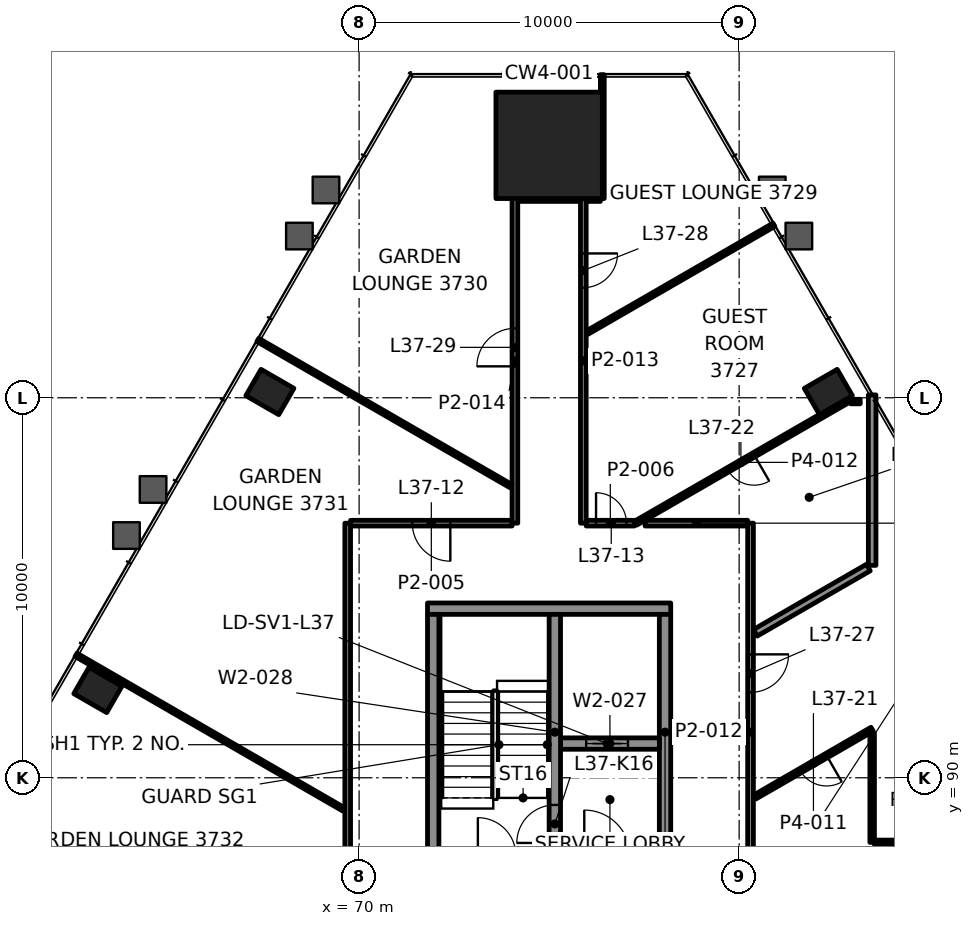
"""IFC4 building model, lengths in metres.
Left out: names, types, materials, properties, quantities, classifications, styles, units other than length and angle.
Written with IfcOpenShell. Run it as: python <this file> out.ifc"""

import sys

from ifc_helpers import new_model, si_unit, direction, frame, frame_2d, origin, origin_2d, place, context, subcontext, project, spatial, rectangle, hollow_rectangle, extrude, element, fill, save


model = new_model("IFC4")
c1 = context("Model", 3, precision=1e-05, world=origin(), true_north=direction((0.0, 1.0)))
c2 = subcontext(c1, "Body", "Model", "MODEL_VIEW")
j1 = project(units=[si_unit("LENGTHUNIT", "METRE"), si_unit("PLANEANGLEUNIT", "RADIAN")], contexts=[c1])
p1 = place(None, origin())
s1 = spatial("IfcSite", under=j1, at=p1, CompositionType="ELEMENT")
p2 = place(p1, origin())
s2 = spatial("IfcBuilding", under=s1, at=p2, CompositionType="ELEMENT")
p3 = place(p2, frame((0.0, 0.0, 163.6)))
s3 = spatial("IfcBuildingStorey", under=s2, at=p3, CompositionType="ELEMENT", Elevation=163.6)
p4 = place(p3, frame((75.0, 106.642, 0.0), z_axis=(0.0, 0.0, 1.0), x_axis=(-1.0, 0.0, 0.0)))
e1 = element("IfcColumn", 1, at=p4, inside=s3, PredefinedType="COLUMN", context=c2, shape_type="SweptSolid", body=[
    extrude(rectangle(XDim=2.8, YDim=2.8, at=origin_2d()), origin(), (0.0, 0.0, 1.0), 3.9),
])
for number, where, z_axis, x_axis in (
    (2, (82.348, 100.151, -0.0), (0.0, 0.0, 1.0), (-0.5, 0.866, 0.0)),
    (3, (67.652, 100.151, -0.0), (0.0, 0.0, 1.0), (-0.5, -0.866, 0.0)),
    (4, (63.125, 92.31, -0.0), (0.0, 0.0, 1.0), (-0.5, -0.866, 0.0)),
):
    element("IfcColumn", number, at=place(p3, frame(where, z_axis=z_axis, x_axis=x_axis)), inside=s3, PredefinedType="COLUMN", context=c2, shape_type="SweptSolid", body=[
        extrude(hollow_rectangle(XDim=0.8, YDim=1.0, WallThickness=0.05, at=origin_2d()), origin(), (0.0, 0.0, 1.0), 3.9),
    ])
p5 = place(p3, frame((71.8, 94.45, 0.0), z_axis=(0.0, 0.0, 1.0), x_axis=(1.0, 0.0, 0.0)))
e5 = element("IfcWall", 5, at=p5, inside=s3, PredefinedType="SHEAR", context=c2, shape_type="SweptSolid", body=[
    extrude(rectangle(XDim=6.4, YDim=0.3, at=frame_2d((3.2, 0.0))), origin(), (0.0, 0.0, 1.0), 3.7),
])
for number, where, z_axis, x_axis in (
    (6, (71.95, 88.1, 0.0), (0.0, 0.0, 1.0), (0.0, 1.0, 0.0)),
    (7, (78.05, 88.1, 0.0), (0.0, 0.0, 1.0), (0.0, 1.0, 0.0)),
):
    element("IfcWall", number, at=place(p3, frame(where, z_axis=z_axis, x_axis=x_axis)), inside=s3, PredefinedType="SHEAR", context=c2, shape_type="SweptSolid", body=[
        extrude(rectangle(XDim=6.2, YDim=0.3, at=frame_2d((3.1, 0.0))), origin(), (0.0, 0.0, 1.0), 3.7),
    ])
p6 = place(p3, frame((75.3, 90.9, 0.0), z_axis=(0.0, 0.0, 1.0), x_axis=(1.0, 0.0, 0.0)))
e8 = element("IfcWall", 8, at=p6, inside=s3, PredefinedType="SHEAR", context=c2, shape_type="SweptSolid", body=[
    extrude(rectangle(XDim=2.6, YDim=0.3, at=frame_2d((1.3, 0.0))), origin(), (0.0, 0.0, 1.0), 3.7),
])
p7 = place(p6, frame((0.675, 0.0, 0.0)))
e9 = element("IfcOpeningElement", 9, at=p7, cuts=e8, PredefinedType="OPENING", context=c2, shape_type="SweptSolid", body=[
    extrude(rectangle(XDim=1.1, YDim=2.1, at=frame_2d((0.55, 1.05))), frame((0.0, 0.16, 0.0), z_axis=(0.0, -1.0, 0.0), x_axis=(1.0, 0.0, 0.0)), (0.0, 0.0, 1.0), 0.32),
])
p8 = place(p3, frame((75.15, 88.1, 0.0), z_axis=(0.0, 0.0, 1.0), x_axis=(0.0, 1.0, 0.0)))
e10 = element("IfcWall", 10, at=p8, inside=s3, PredefinedType="SHEAR", context=c2, shape_type="SweptSolid", body=[
    extrude(rectangle(XDim=6.2, YDim=0.3, at=frame_2d((3.1, 0.0))), origin(), (0.0, 0.0, 1.0), 3.7),
])
p9 = place(p8, frame((0.185, 0.0, 0.0)))
e11 = element("IfcOpeningElement", 11, at=p9, cuts=e10, PredefinedType="OPENING", context=c2, shape_type="SweptSolid", body=[
    extrude(rectangle(XDim=1.0, YDim=2.1, at=frame_2d((0.5, 1.05))), frame((0.0, 0.16, 0.0), z_axis=(0.0, -1.0, 0.0), x_axis=(1.0, 0.0, 0.0)), (0.0, 0.0, 1.0), 0.32),
])
p10 = place(p3, frame((83.56, 88.3, 0.0), z_axis=(0.0, 0.0, 1.0), x_axis=(1.0, 0.0, 0.0)))
e12 = element("IfcWall", 12, at=p10, inside=s3, PredefinedType="PARTITIONING", context=c2, shape_type="SweptSolid", body=[
    extrude(rectangle(XDim=0.585, YDim=0.12, at=frame_2d((0.292, 0.0))), origin(), (0.0, 0.0, 1.0), 3.1),
])
p11 = place(p3, frame((74.025, 96.7, 0.0), z_axis=(0.0, 0.0, 1.0), x_axis=(-1.0, 0.0, 0.0)))
e13 = element("IfcWall", 13, at=p11, inside=s3, PredefinedType="PARTITIONING", context=c2, shape_type="SweptSolid", body=[
    extrude(rectangle(XDim=4.25, YDim=0.15, at=frame_2d((2.125, 0.0))), origin(), (0.0, 0.0, 1.0), 3.1),
])
p12 = place(p11, frame((1.625, 0.0, 0.0)))
e14 = element("IfcOpeningElement", 14, at=p12, cuts=e13, PredefinedType="OPENING", context=c2, shape_type="SweptSolid", body=[
    extrude(rectangle(XDim=1.0, YDim=2.1, at=frame_2d((0.5, 1.05))), frame((0.0, 0.085, 0.0), z_axis=(0.0, -1.0, 0.0), x_axis=(1.0, 0.0, 0.0)), (0.0, 0.0, 1.0), 0.17),
])
p13 = place(p3, frame((75.975, 96.7, 0.0), z_axis=(0.0, 0.0, 1.0), x_axis=(1.0, 0.0, 0.0)))
e15 = element("IfcWall", 15, at=p13, inside=s3, PredefinedType="PARTITIONING", context=c2, shape_type="SweptSolid", body=[
    extrude(rectangle(XDim=1.27, YDim=0.15, at=frame_2d((0.635, 0.0))), origin(), (0.0, 0.0, 1.0), 3.1),
])
p14 = place(p13, frame((0.26, 0.0, 0.0)))
e16 = element("IfcOpeningElement", 16, at=p14, cuts=e15, PredefinedType="OPENING", context=c2, shape_type="SweptSolid", body=[
    extrude(rectangle(XDim=0.8, YDim=2.1, at=frame_2d((0.4, 1.05))), frame((0.0, 0.085, 0.0), z_axis=(0.0, -1.0, 0.0), x_axis=(1.0, 0.0, 0.0)), (0.0, 0.0, 1.0), 0.17),
])
p15 = place(p3, frame((82.938, 99.9, 0.0), z_axis=(0.0, 0.0, 1.0), x_axis=(1.0, 0.0, 0.0)))
e17 = element("IfcWall", 17, at=p15, inside=s3, PredefinedType="PARTITIONING", context=c2, shape_type="SweptSolid", body=[
    extrude(rectangle(XDim=0.248, YDim=0.12, at=frame_2d((0.124, 0.0))), origin(), (0.0, 0.0, 1.0), 3.1),
])
p16 = place(p3, frame((74.176, 105.242, 0.0), z_axis=(0.0, 0.0, 1.0), x_axis=(1.0, 0.0, 0.0)))
e18 = element("IfcWall", 18, at=p16, inside=s3, PredefinedType="PARTITIONING", context=c2, shape_type="SweptSolid", body=[
    extrude(rectangle(XDim=1.649, YDim=0.15, at=frame_2d((0.825, 0.0))), origin(), (0.0, 0.0, 1.0), 3.097),
])
p17 = place(p3, frame((80.427, 85.974, 0.0), z_axis=(0.0, 0.0, 1.0), x_axis=(0.866031085144, 0.499990159468, 0.0)))
e19 = element("IfcWall", 19, at=p17, inside=s3, PredefinedType="PARTITIONING", context=c2, shape_type="SweptSolid", body=[
    extrude(rectangle(XDim=5.052, YDim=0.2, at=frame_2d((2.526, 0.0))), origin(), (0.0, 0.0, 1.0), 3.1),
])
p18 = place(p3, frame((83.5, 91.277, 0.0), z_axis=(0.0, 0.0, 1.0), x_axis=(-0.866028357664, -0.499994883695, 0.0)))
e20 = element("IfcWall", 20, at=p18, inside=s3, PredefinedType="PARTITIONING", context=c2, shape_type="SweptSolid", body=[
    extrude(rectangle(XDim=3.568, YDim=0.12, at=frame_2d((1.784, 0.0))), origin(), (0.0, 0.0, 1.0), 3.1),
])
p19 = place(p18, frame((1.384, 0.0, 0.0)))
e21 = element("IfcOpeningElement", 21, at=p19, cuts=e20, PredefinedType="OPENING", context=c2, shape_type="SweptSolid", body=[
    extrude(rectangle(XDim=0.8, YDim=2.1, at=frame_2d((0.4, 1.05))), frame((0.0, 0.07, 0.0), z_axis=(0.0, -1.0, 0.0), x_axis=(1.0, 0.0, 0.0)), (0.0, 0.0, 1.0), 0.14),
])
p20 = place(p3, frame((80.427, 93.815, 0.0), z_axis=(0.0, 0.0, 1.0), x_axis=(0.866037544249, 0.499978971509, 0.0)))
e22 = element("IfcWall", 22, at=p20, inside=s3, PredefinedType="PARTITIONING", context=c2, shape_type="SweptSolid", body=[
    extrude(rectangle(XDim=3.433, YDim=0.2, at=frame_2d((1.716, 0.0))), origin(), (0.0, 0.0, 1.0), 3.1),
])
p21 = place(p3, frame((82.818, 99.9, 0.0), z_axis=(0.0, 0.0, 1.0), x_axis=(-0.866025499775, -0.499999833739, 0.0)))
e23 = element("IfcWall", 23, at=p21, inside=s3, PredefinedType="PARTITIONING", context=c2, shape_type="SweptSolid", body=[
    extrude(rectangle(XDim=6.4, YDim=0.12, at=frame_2d((3.2, 0.0))), origin(), (0.0, 0.0, 1.0), 2.865),
])
p22 = place(p21, frame((2.8, 0.0, 0.0)))
e24 = element("IfcOpeningElement", 24, at=p22, cuts=e23, PredefinedType="OPENING", context=c2, shape_type="SweptSolid", body=[
    extrude(rectangle(XDim=0.8, YDim=2.1, at=frame_2d((0.4, 1.05))), frame((0.0, 0.07, 0.0), z_axis=(0.0, -1.0, 0.0), x_axis=(1.0, 0.0, 0.0)), (0.0, 0.0, 1.0), 0.14),
])
p23 = place(p3, frame((76.001, 101.715, 0.0), z_axis=(0.0, 0.0, 1.0), x_axis=(0.866015782696, 0.500016663843, 0.0)))
e25 = element("IfcWall", 25, at=p23, inside=s3, PredefinedType="PARTITIONING", context=c2, shape_type="SweptSolid", body=[
    extrude(rectangle(XDim=5.675, YDim=0.1, at=frame_2d((2.837, 0.0))), origin(), (0.0, 0.0, 1.0), 3.1),
])
p24 = place(p3, frame((83.5, 88.3, 0.0), z_axis=(0.0, 0.0, 1.0), x_axis=(0.0, 1.0, 0.0)))
e26 = element("IfcWall", 26, at=p24, inside=s3, PredefinedType="PARTITIONING", context=c2, shape_type="SweptSolid", body=[
    extrude(rectangle(XDim=2.868, YDim=0.12, at=frame_2d((1.434, 0.0))), origin(), (0.0, 0.0, 1.0), 3.022),
])
p25 = place(p3, frame((83.5, 95.589, 0.0), z_axis=(0.0, 0.0, 1.0), x_axis=(0.0, 1.0, 0.0)))
e27 = element("IfcWall", 27, at=p25, inside=s3, PredefinedType="PARTITIONING", context=c2, shape_type="SweptSolid", body=[
    extrude(rectangle(XDim=4.486, YDim=0.2, at=frame_2d((2.243, 0.0))), origin(), (0.0, 0.0, 1.0), 2.865),
])
p26 = place(p3, frame((80.3, 96.7, 0.0), z_axis=(0.0, 0.0, 1.0), x_axis=(0.0, -1.0, 0.0)))
e28 = element("IfcWall", 28, at=p26, inside=s3, PredefinedType="PARTITIONING", context=c2, shape_type="SweptSolid", body=[
    extrude(rectangle(XDim=11.0, YDim=0.15, at=frame_2d((5.5, 0.0))), origin(), (0.0, 0.0, 1.0), 3.022),
])
p27 = place(p26, frame((3.452, 0.0, 0.0)))
e29 = element("IfcOpeningElement", 29, at=p27, cuts=e28, PredefinedType="OPENING", context=c2, shape_type="SweptSolid", body=[
    extrude(rectangle(XDim=1.0, YDim=2.1, at=frame_2d((0.5, 1.05))), frame((0.0, 0.085, 0.0), z_axis=(0.0, -1.0, 0.0), x_axis=(1.0, 0.0, 0.0)), (0.0, 0.0, 1.0), 0.17),
])
p28 = place(p3, frame((76.4, 105.243, 0.0), z_axis=(0.0, 0.0, 1.0), x_axis=(0.0, 1.0, 0.0)))
e30 = element("IfcWall", 30, at=p28, inside=s3, PredefinedType="PARTITIONING", context=c2, shape_type="SweptSolid", body=[
    extrude(rectangle(XDim=3.26, YDim=0.1, at=frame_2d((1.63, 0.0))), origin(), (0.0, 0.0, 1.0), 3.1),
])
p29 = place(p3, frame((75.9, 105.242, 0.0), z_axis=(0.0, 0.0, 1.0), x_axis=(0.0, -1.0, 0.0)))
e31 = element("IfcWall", 31, at=p29, inside=s3, PredefinedType="PARTITIONING", context=c2, shape_type="SweptSolid", body=[
    extrude(rectangle(XDim=8.542, YDim=0.15, at=frame_2d((4.271, 0.0))), origin(), (0.0, 0.0, 1.0), 3.1),
])
p30 = place(p29, frame((1.445, 0.0, 0.0)))
e32 = element("IfcOpeningElement", 32, at=p30, cuts=e31, PredefinedType="OPENING", context=c2, shape_type="SweptSolid", body=[
    extrude(rectangle(XDim=0.9, YDim=2.1, at=frame_2d((0.45, 1.05))), frame((0.0, 0.085, 0.0), z_axis=(0.0, -1.0, 0.0), x_axis=(1.0, 0.0, 0.0)), (0.0, 0.0, 1.0), 0.17),
])
p31 = place(p3, frame((74.1, 96.7, 0.0), z_axis=(0.0, 0.0, 1.0), x_axis=(0.0, 1.0, 0.0)))
e33 = element("IfcWall", 33, at=p31, inside=s3, PredefinedType="PARTITIONING", context=c2, shape_type="SweptSolid", body=[
    extrude(rectangle(XDim=8.542, YDim=0.15, at=frame_2d((4.271, 0.0))), origin(), (0.0, 0.0, 1.0), 3.1),
])
p32 = place(p31, frame((4.127, 0.0, 0.0)))
e34 = element("IfcOpeningElement", 34, at=p32, cuts=e33, PredefinedType="OPENING", context=c2, shape_type="SweptSolid", body=[
    extrude(rectangle(XDim=1.0, YDim=2.1, at=frame_2d((0.5, 1.05))), frame((0.0, 0.085, 0.0), z_axis=(0.0, -1.0, 0.0), x_axis=(1.0, 0.0, 0.0)), (0.0, 0.0, 1.0), 0.17),
])
p33 = place(p3, frame((69.7, 85.7, 0.0), z_axis=(0.0, 0.0, 1.0), x_axis=(0.0, 1.0, 0.0)))
e35 = element("IfcWall", 35, at=p33, inside=s3, PredefinedType="PARTITIONING", context=c2, shape_type="SweptSolid", body=[
    extrude(rectangle(XDim=10.999, YDim=0.15, at=frame_2d((5.5, 0.0))), origin(), (0.0, 0.0, 1.0), 3.022),
])
p34 = place(p3, frame((73.999, 97.673, 0.0), z_axis=(0.0, 0.0, 1.0), x_axis=(-0.86601864019, 0.500011714706, 0.0)))
e36 = element("IfcWall", 36, at=p34, inside=s3, PredefinedType="PARTITIONING", context=c2, shape_type="SweptSolid", body=[
    extrude(rectangle(XDim=7.696, YDim=0.1, at=frame_2d((3.848, 0.0))), origin(), (0.0, 0.0, 1.0), 3.1),
])
p35 = place(p3, frame((69.599, 89.166, 0.0), z_axis=(0.0, 0.0, 1.0), x_axis=(-0.866026732215, 0.499997699084, 0.0)))
e37 = element("IfcWall", 37, at=p35, inside=s3, PredefinedType="PARTITIONING", context=c2, shape_type="SweptSolid", body=[
    extrude(rectangle(XDim=8.139, YDim=0.1, at=frame_2d((4.069, 0.0))), origin(), (0.0, 0.0, 1.0), 2.865),
])
p36 = place(p3, frame((77.525, 96.7, 0.0), z_axis=(0.0, 0.0, 1.0), x_axis=(1.0, 0.0, 0.0)))
e38 = element("IfcWall", 38, at=p36, inside=s3, PredefinedType="PARTITIONING", context=c2, shape_type="SweptSolid", body=[
    extrude(rectangle(XDim=2.7, YDim=0.15, at=frame_2d((1.35, 0.0))), origin(), (0.0, 0.0, 1.0), 3.1),
])
p37 = place(p3, frame((75.975, 105.242, 0.0), z_axis=(0.0, 0.0, 1.0), x_axis=(1.0, 0.0, 0.0)))
e39 = element("IfcWall", 39, at=p37, inside=s3, PredefinedType="PARTITIONING", context=c2, shape_type="SweptSolid", body=[
    extrude(rectangle(XDim=0.375, YDim=0.15, at=frame_2d((0.187, 0.0))), origin(), (0.0, 0.0, 1.0), 3.1),
])
p38 = place(p12, origin())
e40 = element("IfcDoor", 40, at=p38, inside=s3, OperationType="SINGLE_SWING_LEFT", PredefinedType="DOOR", context=c2, shape_type="SweptSolid", body=[
    extrude(rectangle(XDim=1.0, YDim=2.1, at=frame_2d((0.5, 1.05))), frame((0.0, 0.025, 0.0), z_axis=(0.0, -1.0, 0.0), x_axis=(1.0, 0.0, 0.0)), (0.0, 0.0, 1.0), 0.05),
])
fill(e14, e40)
p39 = place(p14, origin())
e41 = element("IfcDoor", 41, at=p39, inside=s3, OperationType="SINGLE_SWING_RIGHT", PredefinedType="DOOR", context=c2, shape_type="SweptSolid", body=[
    extrude(rectangle(XDim=0.8, YDim=2.1, at=frame_2d((0.4, 1.05))), frame((0.0, 0.025, 0.0), z_axis=(0.0, -1.0, 0.0), x_axis=(1.0, 0.0, 0.0)), (0.0, 0.0, 1.0), 0.05),
])
fill(e16, e41)
p40 = place(p19, origin())
e42 = element("IfcDoor", 42, at=p40, inside=s3, OperationType="SINGLE_SWING_RIGHT", PredefinedType="DOOR", context=c2, shape_type="SweptSolid", body=[
    extrude(rectangle(XDim=0.8, YDim=2.1, at=frame_2d((0.4, 1.05))), frame((0.0, 0.025, 0.0), z_axis=(0.0, -1.0, 0.0), x_axis=(1.0, 0.0, 0.0)), (0.0, 0.0, 1.0), 0.05),
])
fill(e21, e42)
p41 = place(p22, origin())
e43 = element("IfcDoor", 43, at=p41, inside=s3, OperationType="SINGLE_SWING_RIGHT", PredefinedType="DOOR", context=c2, shape_type="SweptSolid", body=[
    extrude(rectangle(XDim=0.8, YDim=2.1, at=frame_2d((0.4, 1.05))), frame((0.0, 0.025, 0.0), z_axis=(0.0, -1.0, 0.0), x_axis=(1.0, 0.0, 0.0)), (0.0, 0.0, 1.0), 0.05),
])
fill(e24, e43)
p42 = place(p27, origin())
e44 = element("IfcDoor", 44, at=p42, inside=s3, OperationType="SINGLE_SWING_LEFT", PredefinedType="DOOR", context=c2, shape_type="SweptSolid", body=[
    extrude(rectangle(XDim=1.0, YDim=2.1, at=frame_2d((0.5, 1.05))), frame((0.0, 0.025, 0.0), z_axis=(0.0, -1.0, 0.0), x_axis=(1.0, 0.0, 0.0)), (0.0, 0.0, 1.0), 0.05),
])
fill(e29, e44)
p43 = place(p30, origin())
e45 = element("IfcDoor", 45, at=p43, inside=s3, OperationType="SINGLE_SWING_LEFT", PredefinedType="DOOR", context=c2, shape_type="SweptSolid", body=[
    extrude(rectangle(XDim=0.9, YDim=2.1, at=frame_2d((0.45, 1.05))), frame((0.0, 0.025, 0.0), z_axis=(0.0, -1.0, 0.0), x_axis=(1.0, 0.0, 0.0)), (0.0, 0.0, 1.0), 0.05),
])
fill(e32, e45)
p44 = place(p32, origin())
e46 = element("IfcDoor", 46, at=p44, inside=s3, OperationType="SINGLE_SWING_LEFT", PredefinedType="DOOR", context=c2, shape_type="SweptSolid", body=[
    extrude(rectangle(XDim=1.0, YDim=2.1, at=frame_2d((0.5, 1.05))), frame((0.0, 0.025, 0.0), z_axis=(0.0, -1.0, 0.0), x_axis=(1.0, 0.0, 0.0)), (0.0, 0.0, 1.0), 0.05),
])
fill(e34, e46)
p45 = place(p7, origin())
e47 = element("IfcDoor", 47, at=p45, inside=s3, OperationType="DOUBLE_DOOR_SLIDING", PredefinedType="DOOR", context=c2, shape_type="SweptSolid", body=[
    extrude(rectangle(XDim=1.1, YDim=2.1, at=frame_2d((0.55, 1.05))), frame((0.0, 0.025, 0.0), z_axis=(0.0, -1.0, 0.0), x_axis=(1.0, 0.0, 0.0)), (0.0, 0.0, 1.0), 0.05),
])
fill(e9, e47)
p46 = place(p9, origin())
e48 = element("IfcDoor", 48, at=p46, inside=s3, OperationType="SINGLE_SWING_LEFT", PredefinedType="DOOR", context=c2, shape_type="SweptSolid", body=[
    extrude(rectangle(XDim=1.0, YDim=2.1, at=frame_2d((0.5, 1.05))), frame((0.0, 0.025, 0.0), z_axis=(0.0, -1.0, 0.0), x_axis=(1.0, 0.0, 0.0)), (0.0, 0.0, 1.0), 0.05),
])
fill(e11, e48)
save(model, sys.argv[1])
